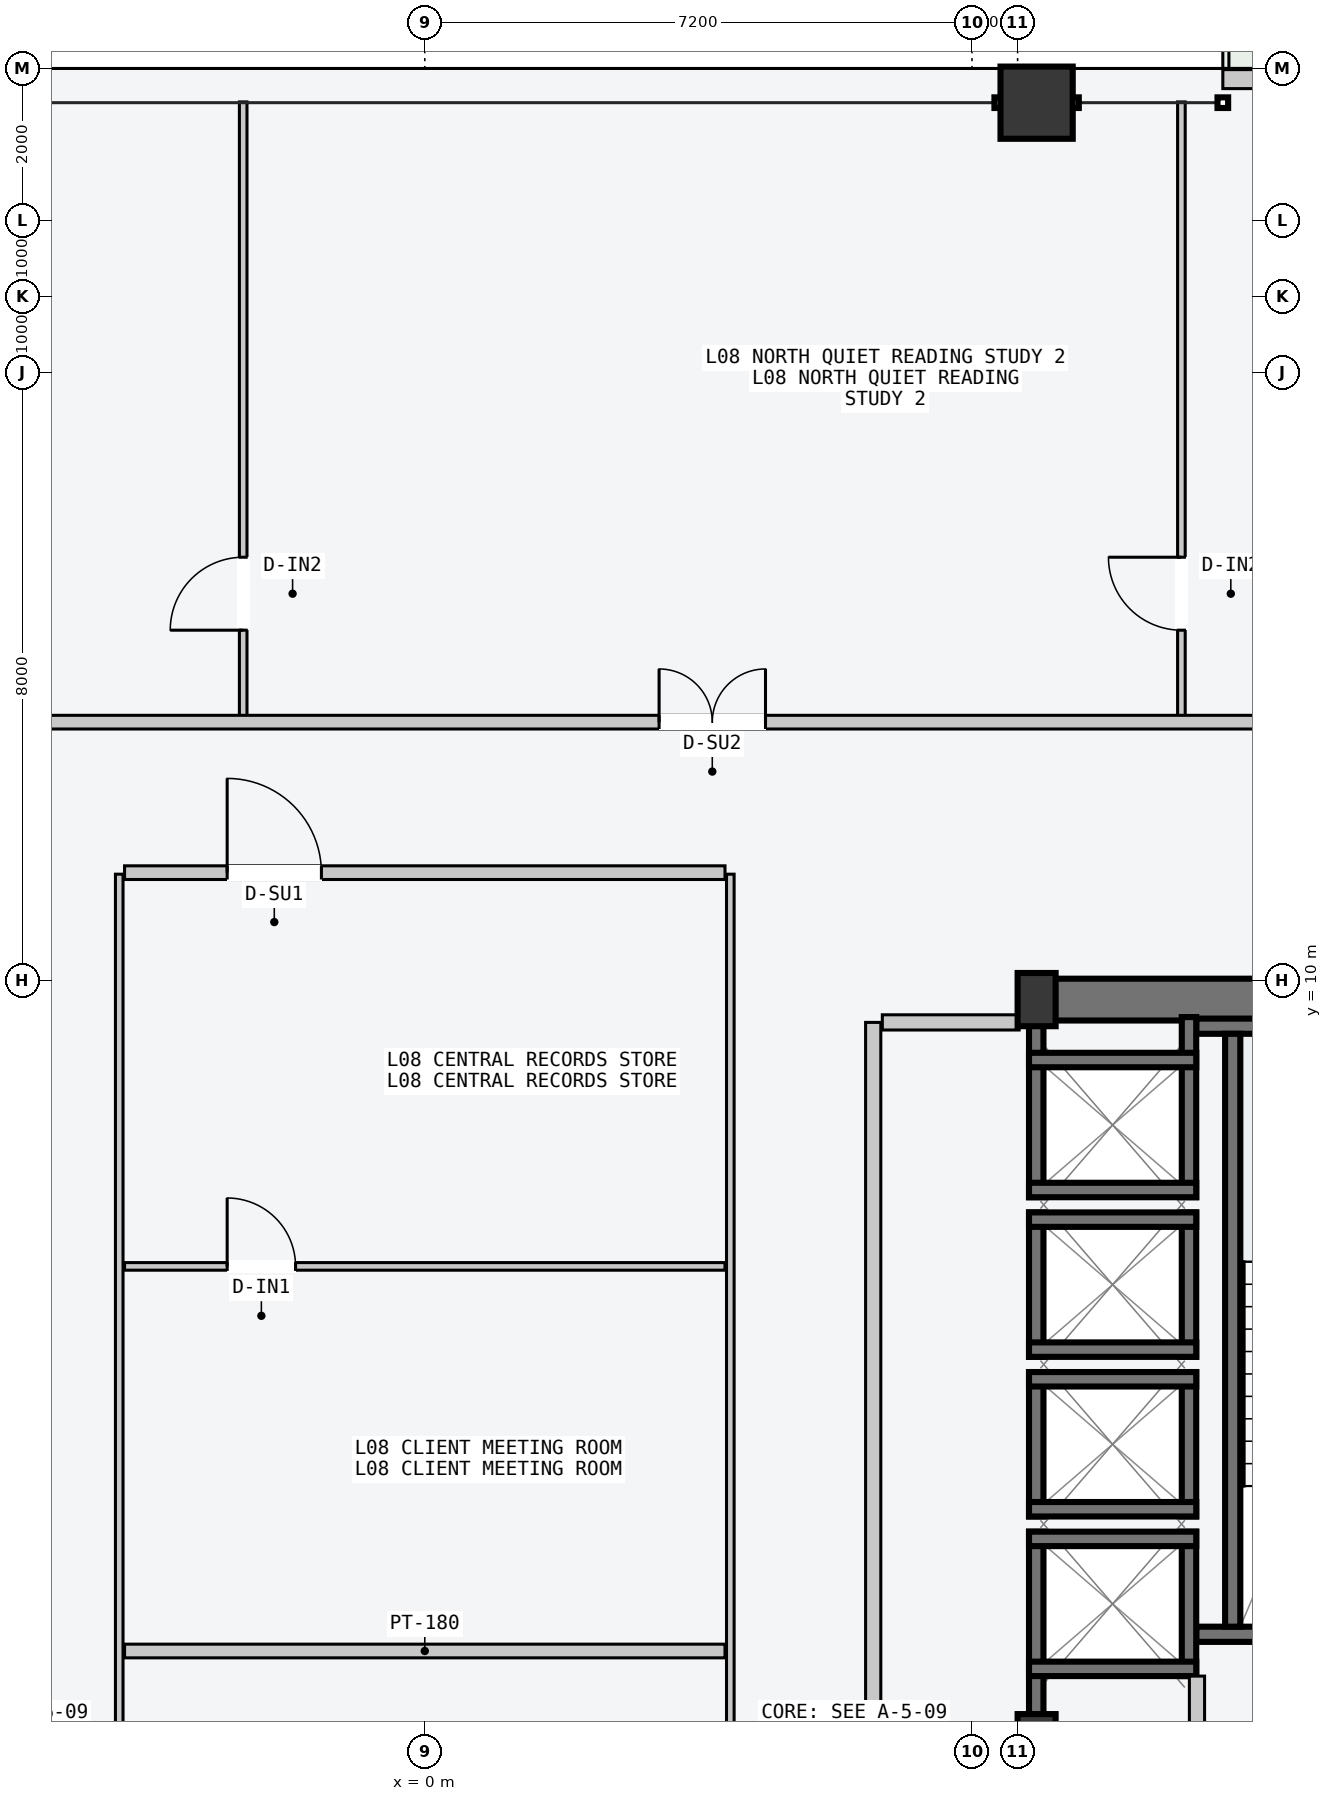
"""IFC4 building model, lengths in metres.
Left out: names, types, materials, properties, quantities, classifications, styles, units other than length and angle.
Written with IfcOpenShell. Run it as: python <this file> out.ifc"""

import sys

from ifc_helpers import new_model, si_unit, direction, frame, frame_2d, origin, origin_2d, place, context, subcontext, project, spatial, rectangle, hollow_rectangle, i_section, extrude, element, fill, save


model = new_model("IFC4")
c1 = context("Model", 3, precision=1e-05, world=origin(), true_north=direction((0.0, 1.0)))
c2 = subcontext(c1, "Body", "Model", "MODEL_VIEW")
j1 = project(units=[si_unit("LENGTHUNIT", "METRE"), si_unit("PLANEANGLEUNIT", "RADIAN")], contexts=[c1])
p1 = place(None, origin())
s1 = spatial("IfcSite", under=j1, at=p1, CompositionType="ELEMENT")
p2 = place(p1, origin())
s2 = spatial("IfcBuilding", under=s1, at=p2, CompositionType="ELEMENT")
p3 = place(p2, frame((0.0, 0.0, 34.8)))
s3 = spatial("IfcBuildingStorey", under=s2, at=p3, CompositionType="ELEMENT", Elevation=34.8)
p4 = place(p3, frame((8.07, 9.75, -0.2), z_axis=(0.0, 0.0, 1.0), x_axis=(1.0, 0.0, 0.0)))
e1 = element("IfcWall", 1, at=p4, inside=s3, PredefinedType="SHEAR", context=c2, shape_type="SweptSolid", body=[
    extrude(rectangle(XDim=6.46, YDim=0.55, at=frame_2d((3.23, 0.0))), origin(), (0.0, 0.0, 1.0), 3.6),
])
p5 = place(p3, frame((10.15, 1.4, -0.2), z_axis=(0.0, 0.0, 1.0), x_axis=(1.0, 0.0, 0.0)))
e2 = element("IfcWall", 2, at=p5, inside=s3, PredefinedType="SOLIDWALL", context=c2, shape_type="SweptSolid", body=[
    extrude(rectangle(XDim=4.1, YDim=0.2, at=frame_2d((2.05, 0.0))), origin(), (0.0, 0.0, 1.0), 3.6),
])
p6 = place(p5, frame((1.5, 0.0, 0.2)))
e3 = element("IfcOpeningElement", 3, at=p6, cuts=e2, PredefinedType="OPENING", context=c2, shape_type="SweptSolid", body=[
    extrude(rectangle(XDim=1.12, YDim=2.18, at=frame_2d((0.56, 1.09))), frame((0.0, 0.11, 0.0), z_axis=(0.0, -1.0, 0.0), x_axis=(1.0, 0.0, 0.0)), (0.0, 0.0, 1.0), 0.22),
])
p7 = place(p3, frame((10.15, 9.4, -0.2), z_axis=(0.0, 0.0, 1.0), x_axis=(1.0, 0.0, 0.0)))
e4 = element("IfcWall", 4, at=p7, inside=s3, PredefinedType="SOLIDWALL", context=c2, shape_type="SweptSolid", body=[
    extrude(rectangle(XDim=4.1, YDim=0.2, at=frame_2d((2.05, 0.0))), origin(), (0.0, 0.0, 1.0), 3.6),
])
p8 = place(p3, frame((10.63, 1.5, -0.2), z_axis=(0.0, 0.0, 1.0), x_axis=(0.0, 1.0, 0.0)))
e5 = element("IfcWall", 5, at=p8, inside=s3, PredefinedType="SOLIDWALL", context=c2, shape_type="SweptSolid", body=[
    extrude(rectangle(XDim=7.8, YDim=0.2, at=frame_2d((3.9, 0.0))), origin(), (0.0, 0.0, 1.0), 3.6),
])
for number, where, z_axis, x_axis in (
    (6, (8.05, 0.0, 0.0), (0.0, 0.0, 1.0), (1.0, 0.0, 0.0)),
    (7, (8.05, 9.75, 0.0), (0.0, 0.0, 1.0), (1.0, 0.0, 0.0)),
):
    element("IfcColumn", number, at=place(p3, frame(where, z_axis=z_axis, x_axis=x_axis)), inside=s3, PredefinedType="COLUMN", context=c2, shape_type="SweptSolid", body=[
        extrude(i_section(OverallWidth=0.5, OverallDepth=0.7, WebThickness=0.028, FlangeThickness=0.045, at=origin_2d()), origin(), (0.0, 0.0, 1.0), 3.6),
    ])
p9 = place(p3, frame((8.05, 21.55, 0.0), z_axis=(0.0, 0.0, 1.0), x_axis=(1.0, 0.0, 0.0)))
e8 = element("IfcColumn", 8, at=p9, inside=s3, PredefinedType="COLUMN", context=c2, shape_type="SweptSolid", body=[
    extrude(hollow_rectangle(XDim=0.95, YDim=0.95, WallThickness=0.048, at=origin_2d()), origin(), (0.0, 0.0, 1.0), 3.6),
])
p10 = place(p3, frame((10.5, 21.86, 0.0), z_axis=(0.0, 0.0, 1.0), x_axis=(1.0, 0.0, 0.0)))
e9 = element("IfcWall", 9, at=p10, inside=s3, PredefinedType="STANDARD", context=c2, shape_type="SweptSolid", body=[
    extrude(rectangle(XDim=3.555, YDim=0.25, at=frame_2d((1.777, 0.0))), origin(), (0.0, 0.0, 1.0), 3.4),
])
p11 = place(p10, frame((0.7, 0.0, 0.85)))
e10 = element("IfcOpeningElement", 10, at=p11, cuts=e9, PredefinedType="OPENING", context=c2, shape_type="SweptSolid", body=[
    extrude(rectangle(XDim=2.2, YDim=2.1, at=frame_2d((1.1, 1.05))), frame((0.0, 0.135, 0.0), z_axis=(0.0, -1.0, 0.0), x_axis=(1.0, 0.0, 0.0)), (0.0, 0.0, 1.0), 0.27),
])
p12 = place(p3, frame((8.045, 0.21, -0.2), z_axis=(0.0, 0.0, 1.0), x_axis=(0.0, 1.0, 0.0)))
e11 = element("IfcWall", 11, at=p12, inside=s3, PredefinedType="SOLIDWALL", context=c2, shape_type="SweptSolid", body=[
    extrude(rectangle(XDim=2.54, YDim=0.19, at=frame_2d((1.27, 0.0))), origin(), (0.0, 0.0, 1.0), 3.6),
])
p13 = place(p3, frame((10.055, 0.85, -0.2), z_axis=(0.0, 0.0, 1.0), x_axis=(0.0, 1.0, 0.0)))
e12 = element("IfcWall", 12, at=p13, inside=s3, PredefinedType="SOLIDWALL", context=c2, shape_type="SweptSolid", body=[
    extrude(rectangle(XDim=1.9, YDim=0.19, at=frame_2d((0.95, 0.0))), origin(), (0.0, 0.0, 1.0), 3.6),
])
for number, where, z_axis, x_axis in (
    (13, (7.95, 2.655, -0.2), (0.0, 0.0, 1.0), (1.0, 0.0, 0.0)),
    (14, (7.95, 0.945, -0.2), (0.0, 0.0, 1.0), (1.0, 0.0, 0.0)),
):
    element("IfcWall", number, at=place(p3, frame(where, z_axis=z_axis, x_axis=x_axis)), inside=s3, PredefinedType="SOLIDWALL", context=c2, shape_type="SweptSolid", body=[
        extrude(rectangle(XDim=2.2, YDim=0.19, at=frame_2d((1.1, 0.0))), origin(), (0.0, 0.0, 1.0), 3.6),
    ])
for number, where, z_axis, x_axis in (
    (15, (8.045, 2.95, -0.2), (0.0, 0.0, 1.0), (0.0, 1.0, 0.0)),
    (16, (10.055, 2.95, -0.2), (0.0, 0.0, 1.0), (0.0, 1.0, 0.0)),
):
    element("IfcWall", number, at=place(p3, frame(where, z_axis=z_axis, x_axis=x_axis)), inside=s3, PredefinedType="SOLIDWALL", context=c2, shape_type="SweptSolid", body=[
        extrude(rectangle(XDim=1.9, YDim=0.19, at=frame_2d((0.95, 0.0))), origin(), (0.0, 0.0, 1.0), 3.6),
    ])
for number, where, z_axis, x_axis in (
    (17, (7.95, 4.755, -0.2), (0.0, 0.0, 1.0), (1.0, 0.0, 0.0)),
    (18, (7.95, 3.045, -0.2), (0.0, 0.0, 1.0), (1.0, 0.0, 0.0)),
):
    element("IfcWall", number, at=place(p3, frame(where, z_axis=z_axis, x_axis=x_axis)), inside=s3, PredefinedType="SOLIDWALL", context=c2, shape_type="SweptSolid", body=[
        extrude(rectangle(XDim=2.2, YDim=0.19, at=frame_2d((1.1, 0.0))), origin(), (0.0, 0.0, 1.0), 3.6),
    ])
for number, where, z_axis, x_axis in (
    (19, (8.045, 5.05, -0.2), (0.0, 0.0, 1.0), (0.0, 1.0, 0.0)),
    (20, (10.055, 5.05, -0.2), (0.0, 0.0, 1.0), (0.0, 1.0, 0.0)),
):
    element("IfcWall", number, at=place(p3, frame(where, z_axis=z_axis, x_axis=x_axis)), inside=s3, PredefinedType="SOLIDWALL", context=c2, shape_type="SweptSolid", body=[
        extrude(rectangle(XDim=1.9, YDim=0.19, at=frame_2d((0.95, 0.0))), origin(), (0.0, 0.0, 1.0), 3.6),
    ])
for number, where, z_axis, x_axis in (
    (21, (7.95, 6.855, -0.2), (0.0, 0.0, 1.0), (1.0, 0.0, 0.0)),
    (22, (7.95, 5.145, -0.2), (0.0, 0.0, 1.0), (1.0, 0.0, 0.0)),
):
    element("IfcWall", number, at=place(p3, frame(where, z_axis=z_axis, x_axis=x_axis)), inside=s3, PredefinedType="SOLIDWALL", context=c2, shape_type="SweptSolid", body=[
        extrude(rectangle(XDim=2.2, YDim=0.19, at=frame_2d((1.1, 0.0))), origin(), (0.0, 0.0, 1.0), 3.6),
    ])
for number, where, z_axis, x_axis in (
    (23, (8.045, 7.15, -0.2), (0.0, 0.0, 1.0), (0.0, 1.0, 0.0)),
    (24, (10.055, 7.15, -0.2), (0.0, 0.0, 1.0), (0.0, 1.0, 0.0)),
):
    element("IfcWall", number, at=place(p3, frame(where, z_axis=z_axis, x_axis=x_axis)), inside=s3, PredefinedType="SOLIDWALL", context=c2, shape_type="SweptSolid", body=[
        extrude(rectangle(XDim=2.37, YDim=0.19, at=frame_2d((1.185, 0.0))), origin(), (0.0, 0.0, 1.0), 3.6),
    ])
for number, where, z_axis, x_axis in (
    (25, (7.95, 8.955, -0.2), (0.0, 0.0, 1.0), (1.0, 0.0, 0.0)),
    (26, (7.95, 7.245, -0.2), (0.0, 0.0, 1.0), (1.0, 0.0, 0.0)),
):
    element("IfcWall", number, at=place(p3, frame(where, z_axis=z_axis, x_axis=x_axis)), inside=s3, PredefinedType="SOLIDWALL", context=c2, shape_type="SweptSolid", body=[
        extrude(rectangle(XDim=2.2, YDim=0.19, at=frame_2d((1.1, 0.0))), origin(), (0.0, 0.0, 1.0), 3.6),
    ])
p14 = place(p3, frame((5.9, -9.45, 0.0), z_axis=(0.0, 0.0, 1.0), x_axis=(0.0, 1.0, 0.0)))
e27 = element("IfcWall", 27, at=p14, inside=s3, PredefinedType="PARTITIONING", context=c2, shape_type="SweptSolid", body=[
    extrude(rectangle(XDim=18.9, YDim=0.2, at=frame_2d((9.45, 0.0))), origin(), (0.0, 0.0, 1.0), 3.4),
])
p15 = place(p14, frame((3.9, 0.0, 0.0)))
e28 = element("IfcOpeningElement", 28, at=p15, cuts=e27, PredefinedType="OPENING", context=c2, shape_type="SweptSolid", body=[
    extrude(rectangle(XDim=1.5, YDim=2.2, at=frame_2d((0.75, 1.1))), frame((0.0, 0.11, 0.0), z_axis=(0.0, -1.0, 0.0), x_axis=(1.0, 0.0, 0.0)), (0.0, 0.0, 1.0), 0.22),
])
p16 = place(p3, frame((6.02, 9.45, 0.0), z_axis=(0.0, 0.0, 1.0), x_axis=(1.0, 0.0, 0.0)))
e29 = element("IfcWall", 29, at=p16, inside=s3, PredefinedType="PARTITIONING", context=c2, shape_type="SweptSolid", body=[
    extrude(rectangle(XDim=1.8, YDim=0.2, at=frame_2d((0.9, 0.0))), origin(), (0.0, 0.0, 1.0), 3.4),
])
p17 = place(p3, frame((10.16, -2.55, 0.0), z_axis=(0.0, 0.0, 1.0), x_axis=(0.0, 1.0, 0.0)))
e30 = element("IfcWall", 30, at=p17, inside=s3, PredefinedType="PARTITIONING", context=c2, shape_type="SweptSolid", body=[
    extrude(rectangle(XDim=3.4, YDim=0.2, at=frame_2d((1.7, 0.0))), origin(), (0.0, 0.0, 1.0), 3.4),
])
p18 = place(p17, frame((1.3, 0.0, 0.0)))
e31 = element("IfcOpeningElement", 31, at=p18, cuts=e30, PredefinedType="OPENING", context=c2, shape_type="SweptSolid", body=[
    extrude(rectangle(XDim=1.1, YDim=2.15, at=frame_2d((0.55, 1.075))), frame((0.0, 0.11, 0.0), z_axis=(0.0, -1.0, 0.0), x_axis=(1.0, 0.0, 0.0)), (0.0, 0.0, 1.0), 0.22),
])
for number, where, z_axis, x_axis in (
    (32, (-4.02, -11.4, 0.0), (0.0, 0.0, 1.0), (0.0, 1.0, 0.0)),
    (33, (4.02, -11.4, 0.0), (0.0, 0.0, 1.0), (0.0, 1.0, 0.0)),
):
    element("IfcWall", number, at=place(p3, frame(where, z_axis=z_axis, x_axis=x_axis)), inside=s3, PredefinedType="PARTITIONING", context=c2, shape_type="SweptSolid", body=[
        extrude(rectangle(XDim=22.8, YDim=0.1, at=frame_2d((11.4, 0.0))), origin(), (0.0, 0.0, 1.0), 3.4),
    ])
p19 = place(p3, frame((-3.95, 1.18, 0.0), z_axis=(0.0, 0.0, 1.0), x_axis=(1.0, 0.0, 0.0)))
e34 = element("IfcWall", 34, at=p19, inside=s3, PredefinedType="PARTITIONING", context=c2, shape_type="SweptSolid", body=[
    extrude(rectangle(XDim=7.9, YDim=0.18, at=frame_2d((3.95, 0.0))), origin(), (0.0, 0.0, 1.0), 3.4),
])
p20 = place(p3, frame((-3.95, 11.42, 0.0), z_axis=(0.0, 0.0, 1.0), x_axis=(1.0, 0.0, 0.0)))
e35 = element("IfcWall", 35, at=p20, inside=s3, PredefinedType="PARTITIONING", context=c2, shape_type="SweptSolid", body=[
    extrude(rectangle(XDim=7.9, YDim=0.18, at=frame_2d((3.95, 0.0))), origin(), (0.0, 0.0, 1.0), 3.4),
])
p21 = place(p20, frame((1.35, 0.0, 0.0)))
e36 = element("IfcOpeningElement", 36, at=p21, cuts=e35, PredefinedType="OPENING", context=c2, shape_type="SweptSolid", body=[
    extrude(rectangle(XDim=1.24, YDim=2.24, at=frame_2d((0.62, 1.12))), frame((0.0, 0.1, 0.0), z_axis=(0.0, -1.0, 0.0), x_axis=(1.0, 0.0, 0.0)), (0.0, 0.0, 1.0), 0.2),
])
p22 = place(p3, frame((-3.95, 6.24, 0.0), z_axis=(0.0, 0.0, 1.0), x_axis=(1.0, 0.0, 0.0)))
e37 = element("IfcWall", 37, at=p22, inside=s3, PredefinedType="PARTITIONING", context=c2, shape_type="SweptSolid", body=[
    extrude(rectangle(XDim=7.9, YDim=0.1, at=frame_2d((3.95, 0.0))), origin(), (0.0, 0.0, 1.0), 3.4),
])
p23 = place(p22, frame((1.35, 0.0, 0.0)))
e38 = element("IfcOpeningElement", 38, at=p23, cuts=e37, PredefinedType="OPENING", context=c2, shape_type="SweptSolid", body=[
    extrude(rectangle(XDim=0.9, YDim=2.15, at=frame_2d((0.45, 1.075))), frame((0.0, 0.06, 0.0), z_axis=(0.0, -1.0, 0.0), x_axis=(1.0, 0.0, 0.0)), (0.0, 0.0, 1.0), 0.12),
])
p24 = place(p3, frame((-2.389, 13.46, 0.0), z_axis=(0.0, 0.0, 1.0), x_axis=(0.0, 1.0, 0.0)))
e39 = element("IfcWall", 39, at=p24, inside=s3, PredefinedType="PARTITIONING", context=c2, shape_type="SweptSolid", body=[
    extrude(rectangle(XDim=8.1, YDim=0.1, at=frame_2d((4.05, 0.0))), origin(), (0.0, 0.0, 1.0), 3.4),
])
p25 = place(p24, frame((1.15, 0.0, 0.0)))
e40 = element("IfcOpeningElement", 40, at=p25, cuts=e39, PredefinedType="OPENING", context=c2, shape_type="SweptSolid", body=[
    extrude(rectangle(XDim=0.96, YDim=2.18, at=frame_2d((0.48, 1.09))), frame((0.0, 0.06, 0.0), z_axis=(0.0, -1.0, 0.0), x_axis=(1.0, 0.0, 0.0)), (0.0, 0.0, 1.0), 0.12),
])
p26 = place(p3, frame((9.955, 13.46, 0.0), z_axis=(0.0, 0.0, 1.0), x_axis=(0.0, 1.0, 0.0)))
e41 = element("IfcWall", 41, at=p26, inside=s3, PredefinedType="PARTITIONING", context=c2, shape_type="SweptSolid", body=[
    extrude(rectangle(XDim=8.1, YDim=0.1, at=frame_2d((4.05, 0.0))), origin(), (0.0, 0.0, 1.0), 3.4),
])
p27 = place(p26, frame((1.15, 0.0, 0.0)))
e42 = element("IfcOpeningElement", 42, at=p27, cuts=e41, PredefinedType="OPENING", context=c2, shape_type="SweptSolid", body=[
    extrude(rectangle(XDim=0.96, YDim=2.18, at=frame_2d((0.48, 1.09))), frame((0.0, 0.06, 0.0), z_axis=(0.0, -1.0, 0.0), x_axis=(1.0, 0.0, 0.0)), (0.0, 0.0, 1.0), 0.12),
])
p28 = place(p3, frame((-18.0, 13.4, 0.0), z_axis=(0.0, 0.0, 1.0), x_axis=(1.0, 0.0, 0.0)))
e43 = element("IfcWall", 43, at=p28, inside=s3, PredefinedType="PARTITIONING", context=c2, shape_type="SweptSolid", body=[
    extrude(rectangle(XDim=36.0, YDim=0.18, at=frame_2d((18.0, 0.0))), origin(), (0.0, 0.0, 1.0), 3.4),
])
p29 = place(p28, frame((7.185, 0.0, 0.0)))
e44 = element("IfcOpeningElement", 44, at=p29, cuts=e43, PredefinedType="OPENING", context=c2, shape_type="SweptSolid", body=[
    extrude(rectangle(XDim=1.24, YDim=2.24, at=frame_2d((0.62, 1.12))), frame((0.0, 0.1, 0.0), z_axis=(0.0, -1.0, 0.0), x_axis=(1.0, 0.0, 0.0)), (0.0, 0.0, 1.0), 0.2),
])
p30 = place(p28, frame((21.083, 0.0, 0.0)))
e45 = element("IfcOpeningElement", 45, at=p30, cuts=e43, PredefinedType="OPENING", context=c2, shape_type="SweptSolid", body=[
    extrude(rectangle(XDim=1.4, YDim=2.2, at=frame_2d((0.7, 1.1))), frame((0.0, 0.1, 0.0), z_axis=(0.0, -1.0, 0.0), x_axis=(1.0, 0.0, 0.0)), (0.0, 0.0, 1.0), 0.2),
])
p31 = place(p28, frame((31.528, 0.0, 0.0)))
e46 = element("IfcOpeningElement", 46, at=p31, cuts=e43, PredefinedType="OPENING", context=c2, shape_type="SweptSolid", body=[
    extrude(rectangle(XDim=0.9, YDim=2.15, at=frame_2d((0.45, 1.075))), frame((0.0, 0.1, 0.0), z_axis=(0.0, -1.0, 0.0), x_axis=(1.0, 0.0, 0.0)), (0.0, 0.0, 1.0), 0.2),
])
p32 = place(p21, origin())
e47 = element("IfcDoor", 47, at=p32, inside=s3, OperationType="SINGLE_SWING_LEFT", PredefinedType="DOOR", context=c2, shape_type="SweptSolid", body=[
    extrude(rectangle(XDim=1.24, YDim=2.24, at=frame_2d((0.62, 1.12))), frame((0.0, 0.025, 0.0), z_axis=(0.0, -1.0, 0.0), x_axis=(1.0, 0.0, 0.0)), (0.0, 0.0, 1.0), 0.05),
])
fill(e36, e47)
p33 = place(p23, origin())
e48 = element("IfcDoor", 48, at=p33, inside=s3, OperationType="SINGLE_SWING_LEFT", PredefinedType="DOOR", context=c2, shape_type="SweptSolid", body=[
    extrude(rectangle(XDim=0.9, YDim=2.15, at=frame_2d((0.45, 1.075))), frame((0.0, 0.025, 0.0), z_axis=(0.0, -1.0, 0.0), x_axis=(1.0, 0.0, 0.0)), (0.0, 0.0, 1.0), 0.05),
])
fill(e38, e48)
p34 = place(p25, origin())
e49 = element("IfcDoor", 49, at=p34, inside=s3, OperationType="SINGLE_SWING_LEFT", PredefinedType="DOOR", context=c2, shape_type="SweptSolid", body=[
    extrude(rectangle(XDim=0.96, YDim=2.18, at=frame_2d((0.48, 1.09))), frame((0.0, 0.025, 0.0), z_axis=(0.0, -1.0, 0.0), x_axis=(1.0, 0.0, 0.0)), (0.0, 0.0, 1.0), 0.05),
])
fill(e40, e49)
p35 = place(p27, origin())
e50 = element("IfcDoor", 50, at=p35, inside=s3, OperationType="SINGLE_SWING_RIGHT", PredefinedType="DOOR", context=c2, shape_type="SweptSolid", body=[
    extrude(rectangle(XDim=0.96, YDim=2.18, at=frame_2d((0.48, 1.09))), frame((0.0, 0.025, 0.0), z_axis=(0.0, -1.0, 0.0), x_axis=(1.0, 0.0, 0.0)), (0.0, 0.0, 1.0), 0.05),
])
fill(e42, e50)
p36 = place(p30, origin())
e51 = element("IfcDoor", 51, at=p36, inside=s3, OperationType="DOUBLE_DOOR_SINGLE_SWING", PredefinedType="DOOR", context=c2, shape_type="SweptSolid", body=[
    extrude(rectangle(XDim=1.4, YDim=2.2, at=frame_2d((0.7, 1.1))), frame((0.0, 0.025, 0.0), z_axis=(0.0, -1.0, 0.0), x_axis=(1.0, 0.0, 0.0)), (0.0, 0.0, 1.0), 0.05),
])
fill(e45, e51)
save(model, sys.argv[1])
